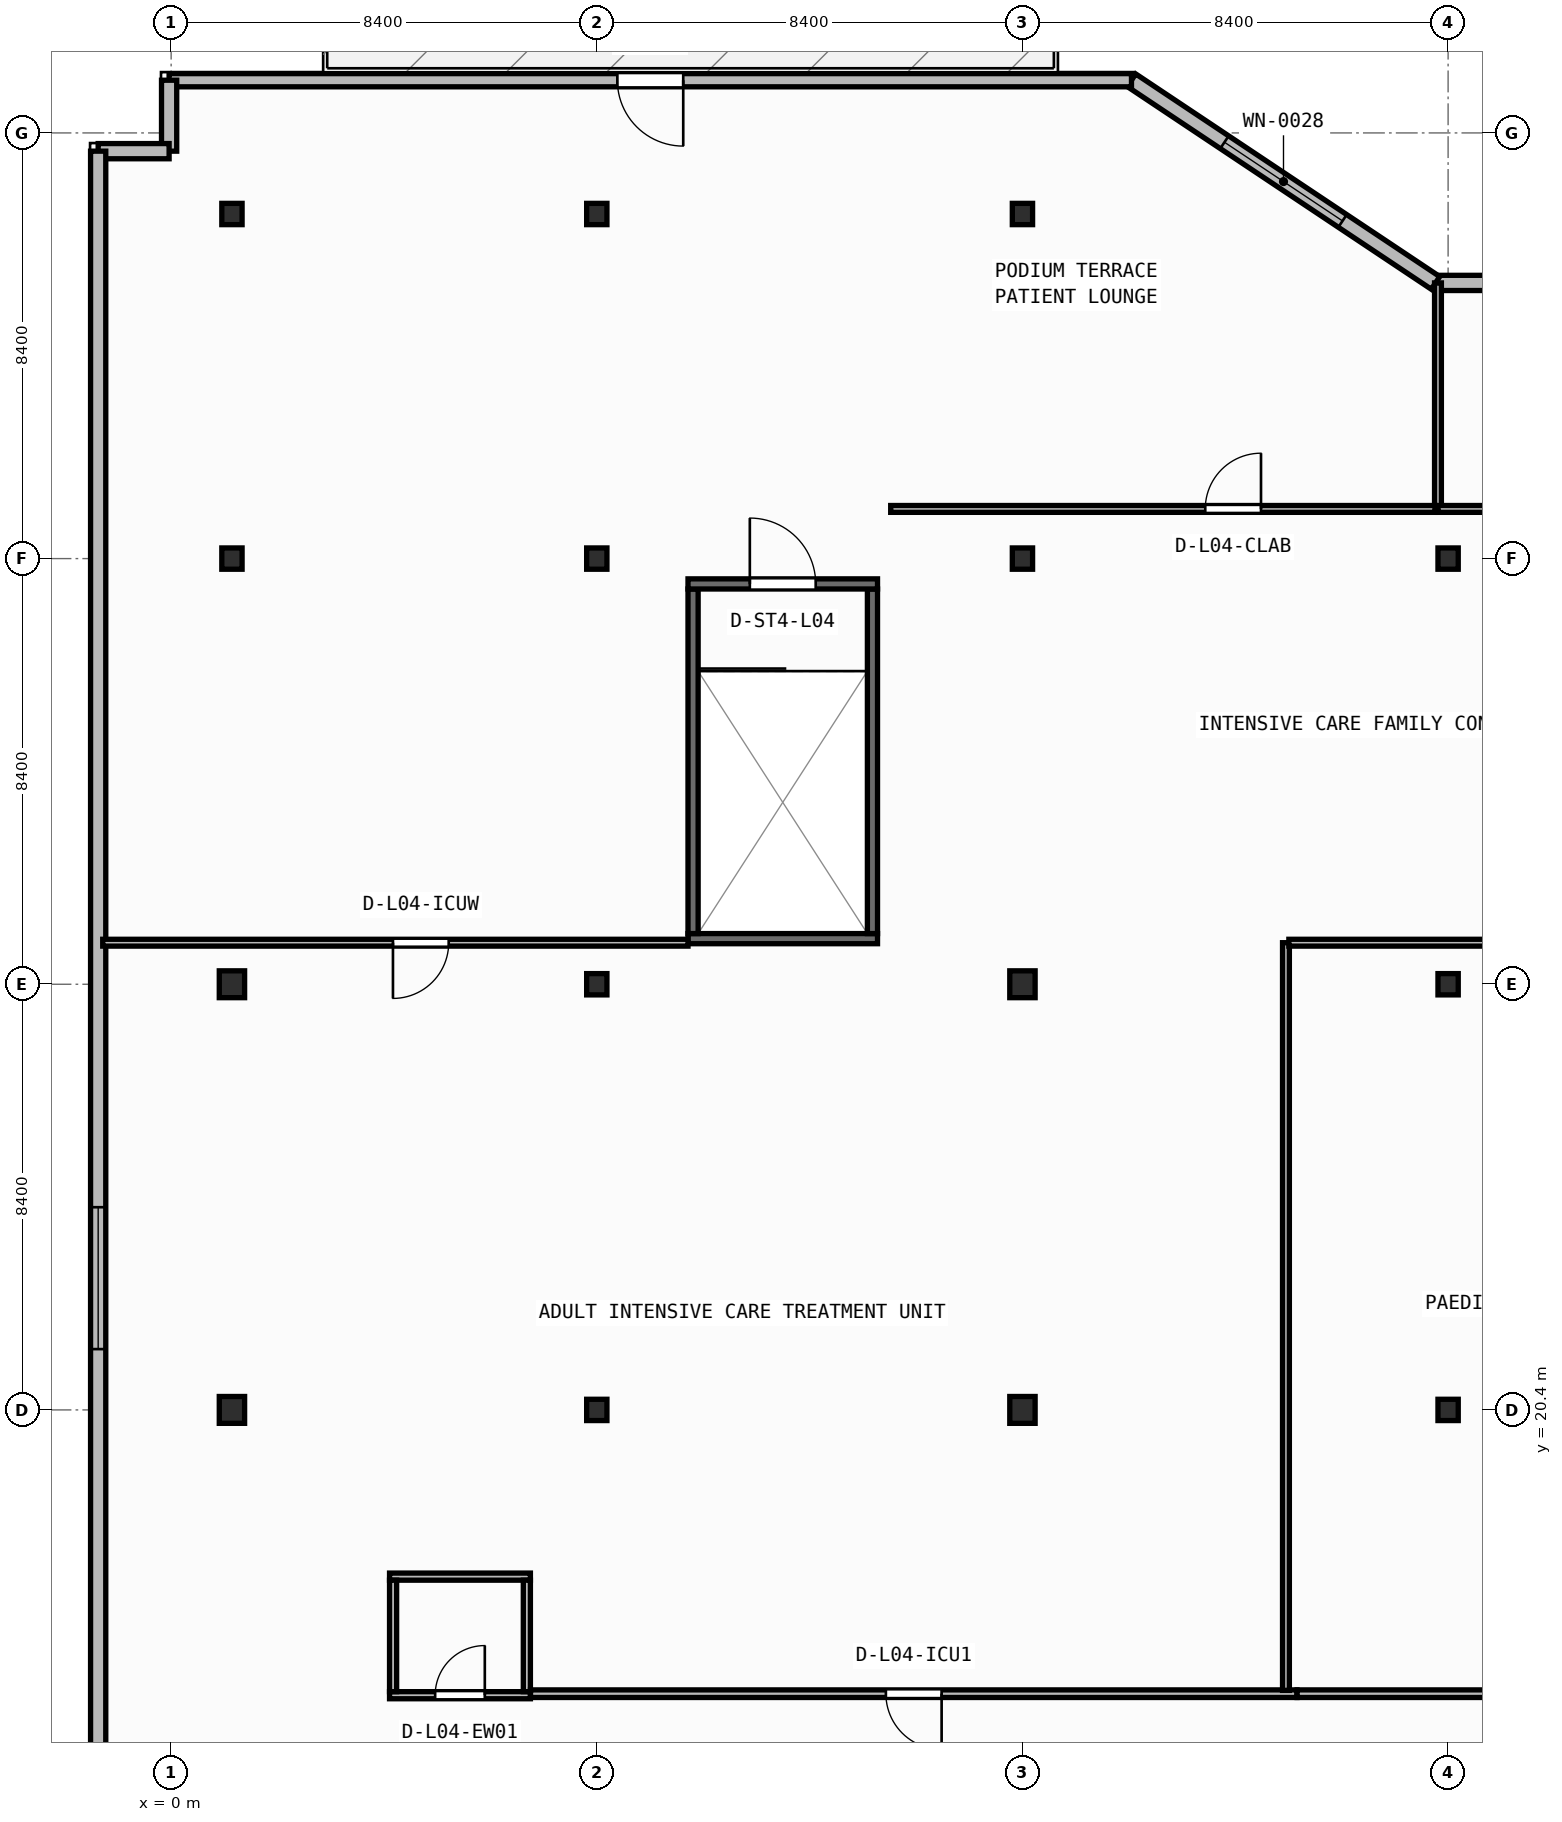
"""IFC4 building model, lengths in metres.
Left out: names, types, materials, properties, quantities, classifications, styles, units other than length and angle.
Written with IfcOpenShell. Run it as: python <this file> out.ifc"""

import sys

from ifc_helpers import new_model, si_unit, direction, frame, frame_2d, origin, origin_2d, place, context, subcontext, project, spatial, rectangle, i_section, extrude, element, fill, save


model = new_model("IFC4")
c1 = context("Model", 3, precision=1e-05, world=origin(), true_north=direction((0.0, 1.0)))
c2 = subcontext(c1, "Body", "Model", "MODEL_VIEW")
j1 = project(units=[si_unit("LENGTHUNIT", "METRE"), si_unit("PLANEANGLEUNIT", "RADIAN")], contexts=[c1])
p1 = place(None, origin())
s1 = spatial("IfcSite", under=j1, at=p1, CompositionType="ELEMENT")
p2 = place(p1, origin())
s2 = spatial("IfcBuilding", under=s1, at=p2, CompositionType="ELEMENT")
p3 = place(p2, frame((0.0, 0.0, 18.0)))
s3 = spatial("IfcBuildingStorey", under=s2, at=p3, CompositionType="ELEMENT", Elevation=18.0)
p4 = place(p3, frame((1.2, 20.4, 0.0), z_axis=(0.0, 0.0, 1.0), x_axis=(1.0, 0.0, 0.0)))
e1 = element("IfcColumn", 1, at=p4, inside=s3, PredefinedType="COLUMN", context=c2, shape_type="SweptSolid", body=[
    extrude(i_section(OverallWidth=0.5, OverallDepth=0.53, WebThickness=0.028, FlangeThickness=0.045, at=origin_2d()), origin(), (0.0, 0.0, 1.0), 4.5),
])
p5 = place(p3, frame((8.4, 20.4, 0.0), z_axis=(0.0, 0.0, 1.0), x_axis=(1.0, 0.0, 0.0)))
e2 = element("IfcColumn", 2, at=p5, inside=s3, PredefinedType="COLUMN", context=c2, shape_type="SweptSolid", body=[
    extrude(i_section(OverallWidth=0.4, OverallDepth=0.42, WebThickness=0.025, FlangeThickness=0.04, at=origin_2d()), origin(), (0.0, 0.0, 1.0), 4.5),
])
p6 = place(p3, frame((16.8, 20.4, 0.0), z_axis=(0.0, 0.0, 1.0), x_axis=(1.0, 0.0, 0.0)))
e3 = element("IfcColumn", 3, at=p6, inside=s3, PredefinedType="COLUMN", context=c2, shape_type="SweptSolid", body=[
    extrude(i_section(OverallWidth=0.5, OverallDepth=0.53, WebThickness=0.028, FlangeThickness=0.045, at=origin_2d()), origin(), (0.0, 0.0, 1.0), 4.5),
])
p7 = place(p3, frame((25.2, 20.4, 0.0), z_axis=(0.0, 0.0, 1.0), x_axis=(1.0, 0.0, 0.0)))
e4 = element("IfcColumn", 4, at=p7, inside=s3, PredefinedType="COLUMN", context=c2, shape_type="SweptSolid", body=[
    extrude(i_section(OverallWidth=0.4, OverallDepth=0.42, WebThickness=0.025, FlangeThickness=0.04, at=origin_2d()), origin(), (0.0, 0.0, 1.0), 4.5),
])
p8 = place(p3, frame((1.2, 28.8, 0.0), z_axis=(0.0, 0.0, 1.0), x_axis=(1.0, 0.0, 0.0)))
e5 = element("IfcColumn", 5, at=p8, inside=s3, PredefinedType="COLUMN", context=c2, shape_type="SweptSolid", body=[
    extrude(i_section(OverallWidth=0.5, OverallDepth=0.53, WebThickness=0.028, FlangeThickness=0.045, at=origin_2d()), origin(), (0.0, 0.0, 1.0), 4.5),
])
p9 = place(p3, frame((8.4, 28.8, 0.0), z_axis=(0.0, 0.0, 1.0), x_axis=(1.0, 0.0, 0.0)))
e6 = element("IfcColumn", 6, at=p9, inside=s3, PredefinedType="COLUMN", context=c2, shape_type="SweptSolid", body=[
    extrude(i_section(OverallWidth=0.4, OverallDepth=0.42, WebThickness=0.025, FlangeThickness=0.04, at=origin_2d()), origin(), (0.0, 0.0, 1.0), 4.5),
])
p10 = place(p3, frame((16.8, 28.8, 0.0), z_axis=(0.0, 0.0, 1.0), x_axis=(1.0, 0.0, 0.0)))
e7 = element("IfcColumn", 7, at=p10, inside=s3, PredefinedType="COLUMN", context=c2, shape_type="SweptSolid", body=[
    extrude(i_section(OverallWidth=0.5, OverallDepth=0.53, WebThickness=0.028, FlangeThickness=0.045, at=origin_2d()), origin(), (0.0, 0.0, 1.0), 4.5),
])
for number, where, z_axis, x_axis in (
    (8, (25.2, 28.8, 0.0), (0.0, 0.0, 1.0), (1.0, 0.0, 0.0)),
    (9, (1.2, 37.2, 0.0), (0.0, 0.0, 1.0), (1.0, 0.0, 0.0)),
    (10, (8.4, 37.2, 0.0), (0.0, 0.0, 1.0), (1.0, 0.0, 0.0)),
    (11, (16.8, 37.2, 0.0), (0.0, 0.0, 1.0), (1.0, 0.0, 0.0)),
    (12, (25.2, 37.2, 0.0), (0.0, 0.0, 1.0), (1.0, 0.0, 0.0)),
    (13, (1.2, 44.0, 0.0), (0.0, 0.0, 1.0), (1.0, 0.0, 0.0)),
    (14, (8.4, 44.0, 0.0), (0.0, 0.0, 1.0), (1.0, 0.0, 0.0)),
    (15, (16.8, 44.0, 0.0), (0.0, 0.0, 1.0), (1.0, 0.0, 0.0)),
):
    element("IfcColumn", number, at=place(p3, frame(where, z_axis=z_axis, x_axis=x_axis)), inside=s3, PredefinedType="COLUMN", context=c2, shape_type="SweptSolid", body=[
        extrude(i_section(OverallWidth=0.4, OverallDepth=0.42, WebThickness=0.025, FlangeThickness=0.04, at=origin_2d()), origin(), (0.0, 0.0, 1.0), 4.5),
    ])
p11 = place(p3, frame((43.048, 42.64, 0.0), z_axis=(0.0, 0.0, 1.0), x_axis=(-1.0, 0.0, 0.0)))
e16 = element("IfcWall", 16, at=p11, inside=s3, PredefinedType="STANDARD", context=c2, shape_type="SweptSolid", body=[
    extrude(rectangle(XDim=18.097, YDim=0.3, at=frame_2d((9.048, 0.0))), origin(), (0.0, 0.0, 1.0), 4.08),
])
p12 = place(p11, frame((7.648, 0.0, 0.85)))
e17 = element("IfcOpeningElement", 17, at=p12, cuts=e16, PredefinedType="OPENING", context=c2, shape_type="SweptSolid", body=[
    extrude(rectangle(XDim=2.8, YDim=2.1, at=frame_2d((1.4, 1.05))), frame((0.0, 0.16, 0.0), z_axis=(0.0, -1.0, 0.0), x_axis=(1.0, 0.0, 0.0)), (0.0, 0.0, 1.0), 0.32),
])
p13 = place(p3, frame((24.952, 42.64, 0.0), z_axis=(0.0, 0.0, 1.0), x_axis=(-0.832050294338, 0.554700196225, 0.0)))
e18 = element("IfcWall", 18, at=p13, inside=s3, PredefinedType="STANDARD", context=c2, shape_type="SweptSolid", body=[
    extrude(rectangle(XDim=7.211, YDim=0.3, at=frame_2d((3.605, 0.0))), origin(), (0.0, 0.0, 1.0), 4.08),
])
p14 = place(p13, frame((2.206, 0.0, 0.85)))
e19 = element("IfcOpeningElement", 19, at=p14, cuts=e18, PredefinedType="OPENING", context=c2, shape_type="SweptSolid", body=[
    extrude(rectangle(XDim=2.8, YDim=2.1, at=frame_2d((1.4, 1.05))), frame((0.0, 0.16, 0.0), z_axis=(0.0, -1.0, 0.0), x_axis=(1.0, 0.0, 0.0)), (0.0, 0.0, 1.0), 0.32),
])
p15 = place(p3, frame((18.952, 46.64, 0.0), z_axis=(0.0, 0.0, 1.0), x_axis=(-1.0, 0.0, 0.0)))
e20 = element("IfcWall", 20, at=p15, inside=s3, PredefinedType="STANDARD", context=c2, shape_type="SweptSolid", body=[
    extrude(rectangle(XDim=18.992, YDim=0.26, at=frame_2d((9.496, 0.0))), origin(), (0.0, 0.0, 1.0), 4.08),
])
p16 = place(p15, frame((8.846, 0.0, 0.0)))
e21 = element("IfcOpeningElement", 21, at=p16, cuts=e20, PredefinedType="OPENING", context=c2, shape_type="SweptSolid", body=[
    extrude(rectangle(XDim=1.3, YDim=2.15, at=frame_2d((0.65, 1.075))), frame((0.0, 0.14, 0.0), z_axis=(0.0, -1.0, 0.0), x_axis=(1.0, 0.0, 0.0)), (0.0, 0.0, 1.0), 0.28),
])
for number, where, z_axis, x_axis in (
    (22, (-0.04, 46.64, 0.0), (0.0, 0.0, 1.0), (0.0, -1.0, 0.0)),
    (23, (-0.04, 45.24, 0.0), (0.0, 0.0, 1.0), (-1.0, 0.0, 0.0)),
):
    element("IfcWall", number, at=place(p3, frame(where, z_axis=z_axis, x_axis=x_axis)), inside=s3, PredefinedType="STANDARD", context=c2, shape_type="SweptSolid", body=[
        extrude(rectangle(XDim=1.4, YDim=0.3, at=frame_2d((0.7, 0.0))), origin(), (0.0, 0.0, 1.0), 4.08),
    ])
p17 = place(p3, frame((-1.44, 45.24, 0.0), z_axis=(0.0, 0.0, 1.0), x_axis=(0.0, -1.0, 0.0)))
e24 = element("IfcWall", 24, at=p17, inside=s3, PredefinedType="STANDARD", context=c2, shape_type="SweptSolid", body=[
    extrude(rectangle(XDim=44.48, YDim=0.3, at=frame_2d((22.24, 0.0))), origin(), (0.0, 0.0, 1.0), 4.08),
])
p18 = place(p17, frame((20.84, 0.0, 0.85)))
e25 = element("IfcOpeningElement", 25, at=p18, cuts=e24, PredefinedType="OPENING", context=c2, shape_type="SweptSolid", body=[
    extrude(rectangle(XDim=2.8, YDim=2.1, at=frame_2d((1.4, 1.05))), frame((0.0, 0.16, 0.0), z_axis=(0.0, -1.0, 0.0), x_axis=(1.0, 0.0, 0.0)), (0.0, 0.0, 1.0), 0.32),
])
p19 = place(p3, frame((10.2, 29.7, 0.0), z_axis=(0.0, 0.0, 1.0), x_axis=(1.0, 0.0, 0.0)))
e26 = element("IfcWall", 26, at=p19, inside=s3, PredefinedType="SHEAR", context=c2, shape_type="SweptSolid", body=[
    extrude(rectangle(XDim=3.74, YDim=0.2, at=frame_2d((1.87, 0.0))), origin(), (0.0, 0.0, 1.0), 4.08),
])
for number, where, z_axis, x_axis in (
    (27, (10.3, 29.8, 0.0), (0.0, 0.0, 1.0), (0.0, 1.0, 0.0)),
    (28, (13.84, 29.8, 0.0), (0.0, 0.0, 1.0), (0.0, 1.0, 0.0)),
):
    element("IfcWall", number, at=place(p3, frame(where, z_axis=z_axis, x_axis=x_axis)), inside=s3, PredefinedType="SHEAR", context=c2, shape_type="SweptSolid", body=[
        extrude(rectangle(XDim=6.8, YDim=0.2, at=frame_2d((3.4, 0.0))), origin(), (0.0, 0.0, 1.0), 4.08),
    ])
p20 = place(p3, frame((10.2, 36.7, 0.0), z_axis=(0.0, 0.0, 1.0), x_axis=(1.0, 0.0, 0.0)))
e29 = element("IfcWall", 29, at=p20, inside=s3, PredefinedType="SHEAR", context=c2, shape_type="SweptSolid", body=[
    extrude(rectangle(XDim=3.74, YDim=0.2, at=frame_2d((1.87, 0.0))), origin(), (0.0, 0.0, 1.0), 4.08),
])
p21 = place(p20, frame((1.22, 0.0, 0.0)))
e30 = element("IfcOpeningElement", 30, at=p21, cuts=e29, PredefinedType="OPENING", context=c2, shape_type="SweptSolid", body=[
    extrude(rectangle(XDim=1.3, YDim=2.15, at=frame_2d((0.65, 1.075))), frame((0.0, 0.11, 0.0), z_axis=(0.0, -1.0, 0.0), x_axis=(1.0, 0.0, 0.0)), (0.0, 0.0, 1.0), 0.22),
])
p22 = place(p3, frame((4.31, 14.77, 0.0), z_axis=(0.0, 0.0, 1.0), x_axis=(1.0, 0.0, 0.0)))
e31 = element("IfcWall", 31, at=p22, inside=s3, PredefinedType="PARTITIONING", context=c2, shape_type="SweptSolid", body=[
    extrude(rectangle(XDim=2.78, YDim=0.14, at=frame_2d((1.39, 0.0))), origin(), (0.0, 0.0, 1.0), 4.08),
])
p23 = place(p22, frame((0.9, 0.0, 0.0)))
e32 = element("IfcOpeningElement", 32, at=p23, cuts=e31, PredefinedType="OPENING", context=c2, shape_type="SweptSolid", body=[
    extrude(rectangle(XDim=0.98, YDim=2.1, at=frame_2d((0.49, 1.05))), frame((0.0, 0.08, 0.0), z_axis=(0.0, -1.0, 0.0), x_axis=(1.0, 0.0, 0.0)), (0.0, 0.0, 1.0), 0.16),
])
p24 = place(p3, frame((4.31, 17.11, 0.0), z_axis=(0.0, 0.0, 1.0), x_axis=(1.0, 0.0, 0.0)))
e33 = element("IfcWall", 33, at=p24, inside=s3, PredefinedType="PARTITIONING", context=c2, shape_type="SweptSolid", body=[
    extrude(rectangle(XDim=2.78, YDim=0.14, at=frame_2d((1.39, 0.0))), origin(), (0.0, 0.0, 1.0), 4.08),
])
for number, where, z_axis, x_axis in (
    (34, (4.38, 14.84, 0.0), (0.0, 0.0, 1.0), (0.0, 1.0, 0.0)),
    (35, (7.02, 14.84, 0.0), (0.0, 0.0, 1.0), (0.0, 1.0, 0.0)),
):
    element("IfcWall", number, at=place(p3, frame(where, z_axis=z_axis, x_axis=x_axis)), inside=s3, PredefinedType="PARTITIONING", context=c2, shape_type="SweptSolid", body=[
        extrude(rectangle(XDim=2.2, YDim=0.14, at=frame_2d((1.1, 0.0))), origin(), (0.0, 0.0, 1.0), 4.08),
    ])
p25 = place(p3, frame((22.218, 14.8, 0.0), z_axis=(0.0, 0.0, 1.0), x_axis=(-1.0, 0.0, 0.0)))
e36 = element("IfcWall", 36, at=p25, inside=s3, PredefinedType="PARTITIONING", context=c2, shape_type="SweptSolid", body=[
    extrude(rectangle(XDim=15.126, YDim=0.15, at=frame_2d((7.563, 0.0))), origin(), (0.0, 0.0, 1.0), 4.08),
])
p26 = place(p25, frame((7.013, 0.0, 0.0)))
e37 = element("IfcOpeningElement", 37, at=p26, cuts=e36, PredefinedType="OPENING", context=c2, shape_type="SweptSolid", body=[
    extrude(rectangle(XDim=1.1, YDim=2.1, at=frame_2d((0.55, 1.05))), frame((0.0, 0.085, 0.0), z_axis=(0.0, -1.0, 0.0), x_axis=(1.0, 0.0, 0.0)), (0.0, 0.0, 1.0), 0.17),
])
p27 = place(p3, frame((45.218, 14.8, 0.0), z_axis=(0.0, 0.0, 1.0), x_axis=(-1.0, 0.0, 0.0)))
e38 = element("IfcWall", 38, at=p27, inside=s3, PredefinedType="PARTITIONING", context=c2, shape_type="SweptSolid", body=[
    extrude(rectangle(XDim=22.998, YDim=0.15, at=frame_2d((11.499, 0.0))), origin(), (0.0, 0.0, 1.0), 4.08),
])
p28 = place(p27, frame((10.949, 0.0, 0.0)))
e39 = element("IfcOpeningElement", 39, at=p28, cuts=e38, PredefinedType="OPENING", context=c2, shape_type="SweptSolid", body=[
    extrude(rectangle(XDim=1.1, YDim=2.1, at=frame_2d((0.55, 1.05))), frame((0.0, 0.085, 0.0), z_axis=(0.0, -1.0, 0.0), x_axis=(1.0, 0.0, 0.0)), (0.0, 0.0, 1.0), 0.17),
])
p29 = place(p3, frame((22.0, 14.865, 0.0), z_axis=(0.0, 0.0, 1.0), x_axis=(0.0, 1.0, 0.0)))
e40 = element("IfcWall", 40, at=p29, inside=s3, PredefinedType="PARTITIONING", context=c2, shape_type="SweptSolid", body=[
    extrude(rectangle(XDim=14.755, YDim=0.135, at=frame_2d((7.377, 0.0))), origin(), (0.0, 0.0, 1.0), 4.08),
])
p30 = place(p3, frame((10.2, 29.62, 0.0), z_axis=(0.0, 0.0, 1.0), x_axis=(-1.0, 0.0, 0.0)))
e41 = element("IfcWall", 41, at=p30, inside=s3, PredefinedType="PARTITIONING", context=c2, shape_type="SweptSolid", body=[
    extrude(rectangle(XDim=11.55, YDim=0.135, at=frame_2d((5.775, 0.0))), origin(), (0.0, 0.0, 1.0), 4.08),
])
p31 = place(p30, frame((4.722, 0.0, 0.0)))
e42 = element("IfcOpeningElement", 42, at=p31, cuts=e41, PredefinedType="OPENING", context=c2, shape_type="SweptSolid", body=[
    extrude(rectangle(XDim=1.1, YDim=2.1, at=frame_2d((0.55, 1.05))), frame((0.0, 0.077, 0.0), z_axis=(0.0, -1.0, 0.0), x_axis=(1.0, 0.0, 0.0)), (0.0, 0.0, 1.0), 0.155),
])
p32 = place(p3, frame((35.998, 29.62, 0.0), z_axis=(0.0, 0.0, 1.0), x_axis=(-1.0, 0.0, 0.0)))
e43 = element("IfcWall", 43, at=p32, inside=s3, PredefinedType="PARTITIONING", context=c2, shape_type="SweptSolid", body=[
    extrude(rectangle(XDim=13.94, YDim=0.135, at=frame_2d((6.97, 0.0))), origin(), (0.0, 0.0, 1.0), 4.08),
])
p33 = place(p3, frame((25.0, 42.64, 0.0), z_axis=(0.0, 0.0, 1.0), x_axis=(0.0, -1.0, 0.0)))
e44 = element("IfcWall", 44, at=p33, inside=s3, PredefinedType="PARTITIONING", context=c2, shape_type="SweptSolid", body=[
    extrude(rectangle(XDim=4.46, YDim=0.135, at=frame_2d((2.23, 0.0))), origin(), (0.0, 0.0, 1.0), 4.08),
])
p34 = place(p3, frame((25.0, 38.18, 0.0), z_axis=(0.0, 0.0, 1.0), x_axis=(1.0, 0.0, 0.0)))
e45 = element("IfcWall", 45, at=p34, inside=s3, PredefinedType="PARTITIONING", context=c2, shape_type="SweptSolid", body=[
    extrude(rectangle(XDim=9.8, YDim=0.135, at=frame_2d((4.9, 0.0))), origin(), (0.0, 0.0, 1.0), 4.08),
])
p35 = place(p34, frame((3.935, 0.0, 0.0)))
e46 = element("IfcOpeningElement", 46, at=p35, cuts=e45, PredefinedType="OPENING", context=c2, shape_type="SweptSolid", body=[
    extrude(rectangle(XDim=1.1, YDim=2.1, at=frame_2d((0.55, 1.05))), frame((0.0, 0.077, 0.0), z_axis=(0.0, -1.0, 0.0), x_axis=(1.0, 0.0, 0.0)), (0.0, 0.0, 1.0), 0.155),
])
p36 = place(p3, frame((14.2, 38.18, 0.0), z_axis=(0.0, 0.0, 1.0), x_axis=(1.0, 0.0, 0.0)))
e47 = element("IfcWall", 47, at=p36, inside=s3, PredefinedType="PARTITIONING", context=c2, shape_type="SweptSolid", body=[
    extrude(rectangle(XDim=10.742, YDim=0.135, at=frame_2d((5.371, 0.0))), origin(), (0.0, 0.0, 1.0), 4.08),
])
p37 = place(p36, frame((6.208, 0.0, 0.0)))
e48 = element("IfcOpeningElement", 48, at=p37, cuts=e47, PredefinedType="OPENING", context=c2, shape_type="SweptSolid", body=[
    extrude(rectangle(XDim=1.1, YDim=2.1, at=frame_2d((0.55, 1.05))), frame((0.0, 0.077, 0.0), z_axis=(0.0, -1.0, 0.0), x_axis=(1.0, 0.0, 0.0)), (0.0, 0.0, 1.0), 0.155),
])
p38 = place(p14, origin())
e49 = element("IfcWindow", 49, at=p38, inside=s3, PartitioningType="SINGLE_PANEL", PredefinedType="WINDOW", context=c2, shape_type="SweptSolid", body=[
    extrude(rectangle(XDim=2.8, YDim=2.1, at=frame_2d((1.4, 1.05))), frame((0.0, 0.03, 0.0), z_axis=(0.0, -1.0, 0.0), x_axis=(1.0, 0.0, 0.0)), (0.0, 0.0, 1.0), 0.06),
])
fill(e19, e49)
p39 = place(p16, origin())
e50 = element("IfcDoor", 50, at=p39, inside=s3, OperationType="SINGLE_SWING_LEFT", PredefinedType="DOOR", context=c2, shape_type="SweptSolid", body=[
    extrude(rectangle(XDim=1.3, YDim=2.15, at=frame_2d((0.65, 1.075))), frame((0.0, 0.025, 0.0), z_axis=(0.0, -1.0, 0.0), x_axis=(1.0, 0.0, 0.0)), (0.0, 0.0, 1.0), 0.05),
])
fill(e21, e50)
p40 = place(p18, origin())
e51 = element("IfcWindow", 51, at=p40, inside=s3, PartitioningType="SINGLE_PANEL", PredefinedType="WINDOW", context=c2, shape_type="SweptSolid", body=[
    extrude(rectangle(XDim=2.8, YDim=2.1, at=frame_2d((1.4, 1.05))), frame((0.0, 0.03, 0.0), z_axis=(0.0, -1.0, 0.0), x_axis=(1.0, 0.0, 0.0)), (0.0, 0.0, 1.0), 0.06),
])
fill(e25, e51)
p41 = place(p21, origin())
e52 = element("IfcDoor", 52, at=p41, inside=s3, OperationType="SINGLE_SWING_LEFT", PredefinedType="DOOR", context=c2, shape_type="SweptSolid", body=[
    extrude(rectangle(XDim=1.3, YDim=2.15, at=frame_2d((0.65, 1.075))), frame((0.0, 0.025, 0.0), z_axis=(0.0, -1.0, 0.0), x_axis=(1.0, 0.0, 0.0)), (0.0, 0.0, 1.0), 0.05),
])
fill(e30, e52)
p42 = place(p23, origin())
e53 = element("IfcDoor", 53, at=p42, inside=s3, OperationType="SINGLE_SWING_RIGHT", PredefinedType="DOOR", context=c2, shape_type="SweptSolid", body=[
    extrude(rectangle(XDim=0.98, YDim=2.1, at=frame_2d((0.49, 1.05))), frame((0.0, 0.025, 0.0), z_axis=(0.0, -1.0, 0.0), x_axis=(1.0, 0.0, 0.0)), (0.0, 0.0, 1.0), 0.05),
])
fill(e32, e53)
p43 = place(p26, origin())
e54 = element("IfcDoor", 54, at=p43, inside=s3, OperationType="SINGLE_SWING_LEFT", PredefinedType="DOOR", context=c2, shape_type="SweptSolid", body=[
    extrude(rectangle(XDim=1.1, YDim=2.1, at=frame_2d((0.55, 1.05))), frame((0.0, 0.025, 0.0), z_axis=(0.0, -1.0, 0.0), x_axis=(1.0, 0.0, 0.0)), (0.0, 0.0, 1.0), 0.05),
])
fill(e37, e54)
p44 = place(p31, origin())
e55 = element("IfcDoor", 55, at=p44, inside=s3, OperationType="SINGLE_SWING_RIGHT", PredefinedType="DOOR", context=c2, shape_type="SweptSolid", body=[
    extrude(rectangle(XDim=1.1, YDim=2.1, at=frame_2d((0.55, 1.05))), frame((0.0, 0.025, 0.0), z_axis=(0.0, -1.0, 0.0), x_axis=(1.0, 0.0, 0.0)), (0.0, 0.0, 1.0), 0.05),
])
fill(e42, e55)
p45 = place(p37, origin())
e56 = element("IfcDoor", 56, at=p45, inside=s3, OperationType="SINGLE_SWING_RIGHT", PredefinedType="DOOR", context=c2, shape_type="SweptSolid", body=[
    extrude(rectangle(XDim=1.1, YDim=2.1, at=frame_2d((0.55, 1.05))), frame((0.0, 0.025, 0.0), z_axis=(0.0, -1.0, 0.0), x_axis=(1.0, 0.0, 0.0)), (0.0, 0.0, 1.0), 0.05),
])
fill(e48, e56)
save(model, sys.argv[1])
